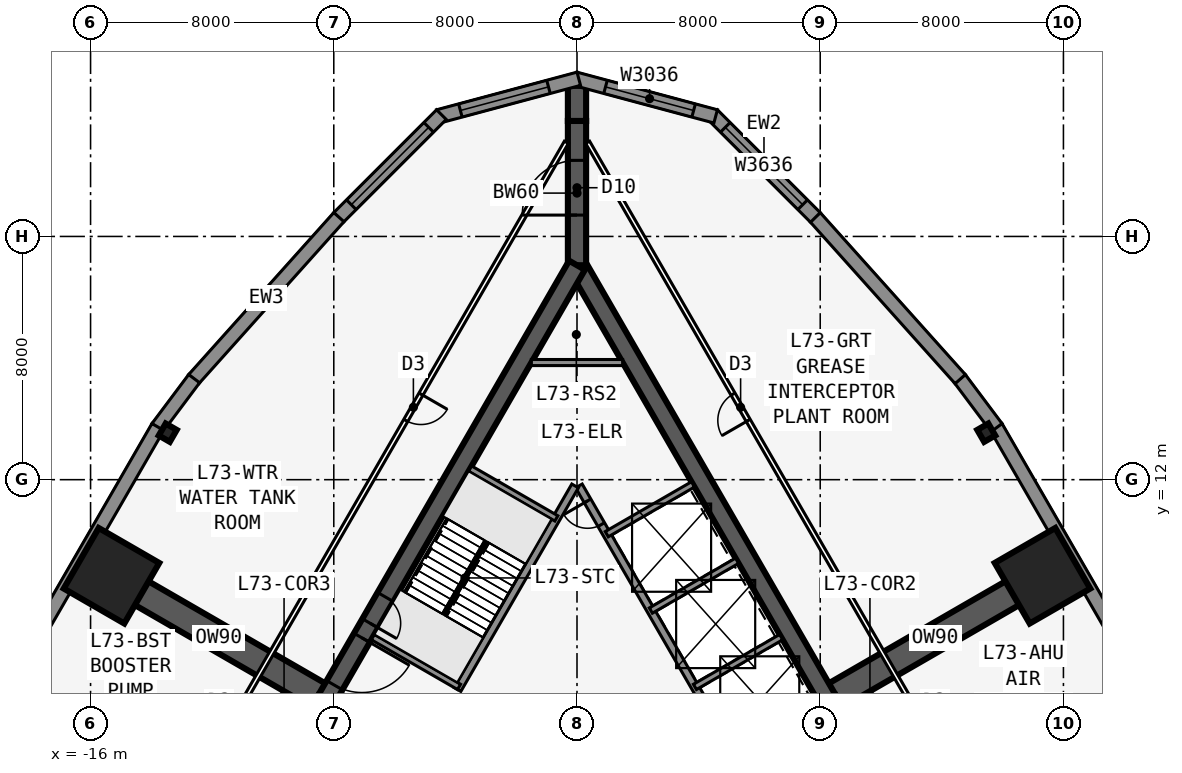
"""IFC4 building model, lengths in metres.
Left out: names, types, materials, properties, quantities, classifications, styles, units other than length and angle.
Written with IfcOpenShell. Run it as: python <this file> out.ifc"""

import sys

from ifc_helpers import new_model, si_unit, direction, frame, frame_2d, origin, origin_2d, place, context, subcontext, project, spatial, polyline, rectangle, i_section, outline, extrude, element, fill, save


model = new_model("IFC4")
c1 = context("Model", 3, precision=1e-05, world=origin(), true_north=direction((0.0, 1.0)))
c2 = subcontext(c1, "Body", "Model", "MODEL_VIEW")
j1 = project(units=[si_unit("LENGTHUNIT", "METRE"), si_unit("PLANEANGLEUNIT", "RADIAN")], contexts=[c1])
p1 = place(None, origin())
s1 = spatial("IfcSite", under=j1, at=p1, CompositionType="ELEMENT")
p2 = place(p1, origin())
s2 = spatial("IfcBuilding", under=s1, at=p2, CompositionType="ELEMENT")
p3 = place(p2, frame((0.0, 0.0, 275.3)))
s3 = spatial("IfcBuildingStorey", under=s2, at=p3, CompositionType="ELEMENT", Elevation=275.3)
p4 = place(p3, frame((8.25, 4.763, 0.0), z_axis=(0.0, 0.0, 1.0), x_axis=(-0.500002952946, 0.866023698893, 0.0)))
e1 = element("IfcWall", 1, at=p4, inside=s3, PredefinedType="SHEAR", context=c2, shape_type="SweptSolid", body=[
    extrude(rectangle(XDim=16.5, YDim=0.6, at=frame_2d((8.25, 0.0))), origin(), (0.0, 0.0, 1.0), 6.0),
])
p5 = place(p3, frame((5.379, 2.586, 0.0), z_axis=(0.0, 0.0, 1.0), x_axis=(-0.500001375892, 0.866024609411, 0.0)))
e2 = element("IfcWall", 2, at=p5, inside=s3, PredefinedType="SOLIDWALL", context=c2, shape_type="SweptSolid", body=[
    extrude(rectangle(XDim=10.633, YDim=0.25, at=frame_2d((5.316, 0.0))), origin(), (0.0, 0.0, 1.0), 5.75),
])
p6 = place(p5, frame((9.164, 0.0, 0.0)))
e3 = element("IfcOpeningElement", 3, at=p6, cuts=e2, PredefinedType="OPENING", context=c2, shape_type="SweptSolid", body=[
    extrude(rectangle(XDim=0.9, YDim=2.13, at=frame_2d((0.45, 1.065))), frame((0.0, 0.135, 0.0), z_axis=(0.0, -1.0, 0.0), x_axis=(1.0, 0.0, 0.0)), (0.0, 0.0, 1.0), 0.27),
])
for number, where, z_axis, x_axis in (
    (4, (3.879, 5.184, 0.0), (0.0, 0.0, 1.0), (0.866, 0.5, 0.0)),
    (5, (2.429, 7.696, 0.0), (0.0, 0.0, 1.0), (0.866, 0.5, 0.0)),
    (6, (0.979, 10.207, 0.0), (0.0, 0.0, 1.0), (0.866, 0.5, 0.0)),
):
    element("IfcWall", number, at=place(p3, frame(where, z_axis=z_axis, x_axis=x_axis)), inside=s3, PredefinedType="SOLIDWALL", context=c2, shape_type="SweptSolid", body=[
        extrude(rectangle(XDim=3.275, YDim=0.2, at=frame_2d((1.637, 0.0))), origin(), (0.0, 0.0, 1.0), 5.75),
    ])
p7 = place(p3, frame((0.0, 19.052, 0.0), z_axis=(0.0, 0.0, 1.0), x_axis=(-0.500002952946, -0.866023698893, 0.0)))
e7 = element("IfcWall", 7, at=p7, inside=s3, PredefinedType="SHEAR", context=c2, shape_type="SweptSolid", body=[
    extrude(rectangle(XDim=16.5, YDim=0.6, at=frame_2d((8.25, 0.0))), origin(), (0.0, 0.0, 1.0), 6.0),
])
p8 = place(p7, frame((14.15, 0.0, 0.0)))
e8 = element("IfcOpeningElement", 8, at=p8, cuts=e7, PredefinedType="OPENING", context=c2, shape_type="SweptSolid", body=[
    extrude(rectangle(XDim=1.8, YDim=2.13, at=frame_2d((0.9, 1.065))), frame((0.0, 0.31, 0.0), z_axis=(0.0, -1.0, 0.0), x_axis=(1.0, 0.0, 0.0)), (0.0, 0.0, 1.0), 0.62),
])
p9 = place(p7, frame((12.6, 0.0, 0.0)))
e9 = element("IfcOpeningElement", 9, at=p9, cuts=e7, PredefinedType="OPENING", context=c2, shape_type="SweptSolid", body=[
    extrude(rectangle(XDim=1.0, YDim=2.13, at=frame_2d((0.5, 1.065))), frame((0.0, 0.31, 0.0), z_axis=(0.0, -1.0, 0.0), x_axis=(1.0, 0.0, 0.0)), (0.0, 0.0, 1.0), 0.62),
])
p10 = place(p3, frame((-0.062, 11.794, 0.0), z_axis=(0.0, 0.0, 1.0), x_axis=(-0.500006680225, -0.86602154692, 0.0)))
e10 = element("IfcWall", 10, at=p10, inside=s3, PredefinedType="SOLIDWALL", context=c2, shape_type="SweptSolid", body=[
    extrude(rectangle(XDim=7.733, YDim=0.25, at=frame_2d((3.866, 0.0))), origin(), (0.0, 0.0, 1.0), 5.75),
])
for number, where, z_axis, x_axis in (
    (11, (-0.679, 10.727, 0.0), (0.0, 0.0, 1.0), (-0.866, 0.5, 0.0)),
    (12, (-3.879, 5.184, 0.0), (0.0, 0.0, 1.0), (-0.866, 0.5, 0.0)),
    (13, (-4.979, 3.279, 0.0), (0.0, 0.0, 1.0), (-0.866, 0.5, 0.0)),
):
    element("IfcWall", number, at=place(p3, frame(where, z_axis=z_axis, x_axis=x_axis)), inside=s3, PredefinedType="SOLIDWALL", context=c2, shape_type="SweptSolid", body=[
        extrude(rectangle(XDim=3.275, YDim=0.2, at=frame_2d((1.637, 0.0))), origin(), (0.0, 0.0, 1.0), 5.75),
    ])
p11 = place(p3, frame((0.0, 19.052, 0.0), z_axis=(0.0, 0.0, 1.0), x_axis=(0.0, 1.0, 0.0)))
e14 = element("IfcWall", 14, at=p11, inside=s3, PredefinedType="SHEAR", context=c2, shape_type="SweptSolid", body=[
    extrude(rectangle(XDim=4.746, YDim=0.6, at=frame_2d((2.373, 0.0))), origin(), (0.0, 0.0, 1.0), 6.0),
])
p12 = place(p11, frame((1.65, 0.0, 0.0)))
e15 = element("IfcOpeningElement", 15, at=p12, cuts=e14, PredefinedType="OPENING", context=c2, shape_type="SweptSolid", body=[
    extrude(rectangle(XDim=1.8, YDim=2.13, at=frame_2d((0.9, 1.065))), frame((0.0, 0.31, 0.0), z_axis=(0.0, -1.0, 0.0), x_axis=(1.0, 0.0, 0.0)), (0.0, 0.0, 1.0), 0.62),
])
p13 = place(p3, frame((0.0, 23.799, 0.0), z_axis=(0.0, 0.0, 1.0), x_axis=(0.0, 1.0, 0.0)))
e16 = element("IfcWall", 16, at=p13, inside=s3, PredefinedType="SHEAR", context=c2, shape_type="SweptSolid", body=[
    extrude(rectangle(XDim=1.155, YDim=0.6, at=frame_2d((0.577, 0.0))), origin(), (0.0, 0.0, 1.0), 6.0),
])
for number, where, z_axis, x_axis in (
    (17, (8.25, 4.763, 0.0), (0.0, 0.0, 1.0), (0.866, 0.5, 0.0)),
    (18, (-8.25, 4.763, 0.0), (0.0, 0.0, 1.0), (-0.866, 0.5, 0.0)),
):
    element("IfcWall", number, at=place(p3, frame(where, z_axis=z_axis, x_axis=x_axis)), inside=s3, PredefinedType="SHEAR", context=c2, shape_type="SweptSolid", body=[
        extrude(rectangle(XDim=8.154, YDim=0.9, at=frame_2d((4.077, 0.0))), origin(), (0.0, 0.0, 1.0), 6.0),
    ])
for number, where, z_axis, x_axis in (
    (19, (13.461, 13.545, 0.0), (0.0, 0.0, 1.0), (0.866, 0.5, 0.0)),
    (20, (-13.461, 13.545, 0.0), (0.0, 0.0, 1.0), (-0.866, 0.5, 0.0)),
):
    element("IfcColumn", number, at=place(p3, frame(where, z_axis=z_axis, x_axis=x_axis)), inside=s3, PredefinedType="COLUMN", context=c2, shape_type="SweptSolid", body=[
        extrude(i_section(OverallWidth=0.419, OverallDepth=0.455, WebThickness=0.042, FlangeThickness=0.068, at=origin_2d()), origin(), (0.0, 0.0, 1.0), 6.0),
    ])
for number, where, z_axis, x_axis in (
    (21, (15.312, 8.84, 0.0), (0.0, 0.0, 1.0), (0.866, 0.5, 0.0)),
    (22, (-15.312, 8.84, 0.0), (0.0, 0.0, 1.0), (-0.866, 0.5, 0.0)),
):
    element("IfcColumn", number, at=place(p3, frame(where, z_axis=z_axis, x_axis=x_axis)), inside=s3, PredefinedType="COLUMN", context=c2, shape_type="SweptSolid", body=[
        extrude(rectangle(XDim=2.3, YDim=2.3, at=origin_2d()), origin(), (0.0, 0.0, 1.0), 6.0),
    ])
p14 = place(p3, frame((18.786, 5.073, 0.0), z_axis=(0.0, 0.0, 1.0), x_axis=(-0.499993662806, 0.866029062534, 0.0)))
e23 = element("IfcWall", 23, at=p14, inside=s3, PredefinedType="SOLIDWALL", context=c2, shape_type="SweptSolid", body=[
    extrude(outline(polyline([(0.0, 0.0), (10.0, 0.0), (10.0, 5.75), (0.0, 5.75), (0.0, 0.0)]), holes=[polyline([(7.25, 2.875), (7.173, 3.457), (6.948, 4.0), (6.591, 4.466), (6.125, 4.823), (5.583, 5.048), (5.0, 5.125), (4.418, 5.048), (3.875, 4.823), (3.409, 4.466), (3.052, 4.0), (2.827, 3.457), (2.75, 2.875), (2.827, 2.293), (3.052, 1.75), (3.409, 1.284), (3.875, 0.926), (4.418, 0.702), (5.0, 0.625), (5.583, 0.702), (6.125, 0.926), (6.591, 1.284), (6.948, 1.75), (7.173, 2.293), (7.25, 2.875)])]), frame((0.0, 0.225, 0.0), z_axis=(0.0, -1.0, 0.0), x_axis=(1.0, 0.0, 0.0)), (0.0, 0.0, 1.0), 0.45),
])
p15 = place(p3, frame((13.801, 13.71, 0.0), z_axis=(0.0, 0.0, 1.0), x_axis=(-0.599592679202, 0.800305328638, 0.0)))
e24 = element("IfcWall", 24, at=p15, inside=s3, PredefinedType="SOLIDWALL", context=c2, shape_type="SweptSolid", body=[
    extrude(rectangle(XDim=2.014, YDim=0.45, at=frame_2d((1.007, 0.0))), origin(), (0.0, 0.0, 1.0), 5.75),
])
p16 = place(p3, frame((12.605, 15.307, 0.0), z_axis=(0.0, 0.0, 1.0), x_axis=(-0.667303550892, 0.744785855778, 0.0)))
e25 = element("IfcWall", 25, at=p16, inside=s3, PredefinedType="SOLIDWALL", context=c2, shape_type="SweptSolid", body=[
    extrude(outline(polyline([(0.0, 0.0), (7.153, 0.0), (7.153, 5.75), (0.0, 5.75), (0.0, 0.0)]), holes=[polyline([(5.826, 2.875), (5.75, 3.457), (5.525, 4.0), (5.167, 4.466), (4.701, 4.823), (4.159, 5.048), (3.576, 5.125), (2.994, 5.048), (2.451, 4.823), (1.985, 4.466), (1.628, 4.0), (1.403, 3.457), (1.326, 2.875), (1.403, 2.293), (1.628, 1.75), (1.985, 1.284), (2.451, 0.926), (2.994, 0.702), (3.576, 0.625), (4.159, 0.702), (4.701, 0.926), (5.167, 1.284), (5.525, 1.75), (5.75, 2.293), (5.826, 2.875)])]), frame((0.0, 0.225, 0.0), z_axis=(0.0, -1.0, 0.0), x_axis=(1.0, 0.0, 0.0)), (0.0, 0.0, 1.0), 0.45),
])
p17 = place(p3, frame((7.841, 20.625, 0.0), z_axis=(0.0, 0.0, 1.0), x_axis=(-0.707106781187, 0.707106781187, 0.0)))
e26 = element("IfcWall", 26, at=p17, inside=s3, PredefinedType="SOLIDWALL", context=c2, shape_type="SweptSolid", body=[
    extrude(rectangle(XDim=4.781, YDim=0.45, at=frame_2d((2.391, 0.0))), origin(), (0.0, 0.0, 1.0), 5.75),
])
p18 = place(p17, frame((0.591, 0.0, 0.9)))
e27 = element("IfcOpeningElement", 27, at=p18, cuts=e26, PredefinedType="OPENING", context=c2, shape_type="SweptSolid", body=[
    extrude(rectangle(XDim=3.6, YDim=3.6, at=frame_2d((1.8, 1.8))), frame((0.0, 0.235, 0.0), z_axis=(0.0, -1.0, 0.0), x_axis=(1.0, 0.0, 0.0)), (0.0, 0.0, 1.0), 0.47),
])
p19 = place(p3, frame((4.561, 23.948, 0.0), z_axis=(0.0, 0.0, 1.0), x_axis=(-0.965926628191, 0.258816052347, 0.0)))
e28 = element("IfcWall", 28, at=p19, inside=s3, PredefinedType="SOLIDWALL", context=c2, shape_type="SweptSolid", body=[
    extrude(outline(polyline([(4.781, 0.225), (4.722, 0.225), (4.375, 0.132), (4.351, 0.225), (0.0, 0.225), (0.0, -0.225), (4.781, -0.225), (4.781, 0.225)])), origin(), (0.0, 0.0, 1.0), 5.75),
])
p20 = place(p19, frame((0.75, 0.0, 0.9)))
e29 = element("IfcOpeningElement", 29, at=p20, cuts=e28, PredefinedType="OPENING", context=c2, shape_type="SweptSolid", body=[
    extrude(rectangle(XDim=3.0, YDim=3.6, at=frame_2d((1.5, 1.8))), frame((0.0, 0.235, 0.0), z_axis=(0.0, -1.0, 0.0), x_axis=(1.0, 0.0, 0.0)), (0.0, 0.0, 1.0), 0.47),
])
p21 = place(p3, frame((0.058, 25.186, 0.0), z_axis=(0.0, 0.0, 1.0), x_axis=(-0.965926628191, -0.258816052347, 0.0)))
e30 = element("IfcWall", 30, at=p21, inside=s3, PredefinedType="SOLIDWALL", context=c2, shape_type="SweptSolid", body=[
    extrude(outline(polyline([(4.781, 0.225), (0.431, 0.225), (0.406, 0.132), (0.059, 0.225), (0.0, 0.225), (0.0, -0.225), (4.781, -0.225), (4.781, 0.225)])), origin(), (0.0, 0.0, 1.0), 5.75),
])
p22 = place(p21, frame((1.031, 0.0, 0.9)))
e31 = element("IfcOpeningElement", 31, at=p22, cuts=e30, PredefinedType="OPENING", context=c2, shape_type="SweptSolid", body=[
    extrude(rectangle(XDim=3.0, YDim=3.6, at=frame_2d((1.5, 1.8))), frame((0.0, 0.235, 0.0), z_axis=(0.0, -1.0, 0.0), x_axis=(1.0, 0.0, 0.0)), (0.0, 0.0, 1.0), 0.47),
])
p23 = place(p3, frame((-4.46, 24.007, 0.0), z_axis=(0.0, 0.0, 1.0), x_axis=(-0.707106781187, -0.707106781187, 0.0)))
e32 = element("IfcWall", 32, at=p23, inside=s3, PredefinedType="SOLIDWALL", context=c2, shape_type="SweptSolid", body=[
    extrude(rectangle(XDim=4.781, YDim=0.45, at=frame_2d((2.391, 0.0))), origin(), (0.0, 0.0, 1.0), 5.75),
])
p24 = place(p23, frame((0.591, 0.0, 0.9)))
e33 = element("IfcOpeningElement", 33, at=p24, cuts=e32, PredefinedType="OPENING", context=c2, shape_type="SweptSolid", body=[
    extrude(rectangle(XDim=3.6, YDim=3.6, at=frame_2d((1.8, 1.8))), frame((0.0, 0.235, 0.0), z_axis=(0.0, -1.0, 0.0), x_axis=(1.0, 0.0, 0.0)), (0.0, 0.0, 1.0), 0.47),
])
p25 = place(p3, frame((-7.833, 20.635, 0.0), z_axis=(0.0, 0.0, 1.0), x_axis=(-0.667303550892, -0.744785855778, 0.0)))
e34 = element("IfcWall", 34, at=p25, inside=s3, PredefinedType="SOLIDWALL", context=c2, shape_type="SweptSolid", body=[
    extrude(outline(polyline([(0.0, 0.0), (7.153, 0.0), (7.153, 5.75), (0.0, 5.75), (0.0, 0.0)]), holes=[polyline([(5.826, 2.875), (5.75, 3.457), (5.525, 4.0), (5.167, 4.466), (4.701, 4.823), (4.159, 5.048), (3.576, 5.125), (2.994, 5.048), (2.451, 4.823), (1.985, 4.466), (1.628, 4.0), (1.403, 3.457), (1.326, 2.875), (1.403, 2.293), (1.628, 1.75), (1.985, 1.284), (2.451, 0.926), (2.994, 0.702), (3.576, 0.625), (4.159, 0.702), (4.701, 0.926), (5.167, 1.284), (5.525, 1.75), (5.75, 2.293), (5.826, 2.875)])]), frame((0.0, 0.225, 0.0), z_axis=(0.0, -1.0, 0.0), x_axis=(1.0, 0.0, 0.0)), (0.0, 0.0, 1.0), 0.45),
])
p26 = place(p3, frame((-12.593, 15.323, 0.0), z_axis=(0.0, 0.0, 1.0), x_axis=(-0.599592679202, -0.800305328638, 0.0)))
e35 = element("IfcWall", 35, at=p26, inside=s3, PredefinedType="SOLIDWALL", context=c2, shape_type="SweptSolid", body=[
    extrude(rectangle(XDim=2.014, YDim=0.45, at=frame_2d((1.007, 0.0))), origin(), (0.0, 0.0, 1.0), 5.75),
])
p27 = place(p3, frame((-13.786, 13.733, 0.0), z_axis=(0.0, 0.0, 1.0), x_axis=(-0.499993662806, -0.866029062534, 0.0)))
e36 = element("IfcWall", 36, at=p27, inside=s3, PredefinedType="SOLIDWALL", context=c2, shape_type="SweptSolid", body=[
    extrude(outline(polyline([(0.0, 0.0), (10.0, 0.0), (10.0, 5.75), (0.0, 5.75), (0.0, 0.0)]), holes=[polyline([(7.25, 2.875), (7.173, 3.457), (6.948, 4.0), (6.591, 4.466), (6.125, 4.823), (5.583, 5.048), (5.0, 5.125), (4.418, 5.048), (3.875, 4.823), (3.409, 4.466), (3.052, 4.0), (2.827, 3.457), (2.75, 2.875), (2.827, 2.293), (3.052, 1.75), (3.409, 1.284), (3.875, 0.926), (4.418, 0.702), (5.0, 0.625), (5.583, 0.702), (6.125, 0.926), (6.591, 1.284), (6.948, 1.75), (7.173, 2.293), (7.25, 2.875)])]), frame((0.0, 0.225, 0.0), z_axis=(0.0, -1.0, 0.0), x_axis=(1.0, 0.0, 0.0)), (0.0, 0.0, 1.0), 0.45),
])
p28 = place(p3, frame((20.177, -11.245, 0.0), z_axis=(0.0, 0.0, 1.0), x_axis=(-0.499998875317, 0.866026053119, 0.0)))
e37 = element("IfcWall", 37, at=p28, inside=s3, PredefinedType="PARTITIONING", context=c2, shape_type="SweptSolid", body=[
    extrude(rectangle(XDim=39.654, YDim=0.15, at=frame_2d((19.827, 0.0))), origin(), (0.0, 0.0, 1.0), 5.75),
])
p29 = place(p28, frame((6.563, 0.0, 0.0)))
e38 = element("IfcOpeningElement", 38, at=p29, cuts=e37, PredefinedType="OPENING", context=c2, shape_type="SweptSolid", body=[
    extrude(rectangle(XDim=1.0, YDim=2.13, at=frame_2d((0.5, 1.065))), frame((0.0, 0.085, 0.0), z_axis=(0.0, -1.0, 0.0), x_axis=(1.0, 0.0, 0.0)), (0.0, 0.0, 1.0), 0.17),
])
p30 = place(p28, frame((16.327, 0.0, 0.0)))
e39 = element("IfcOpeningElement", 39, at=p30, cuts=e37, PredefinedType="OPENING", context=c2, shape_type="SweptSolid", body=[
    extrude(rectangle(XDim=1.0, YDim=2.13, at=frame_2d((0.5, 1.065))), frame((0.0, 0.085, 0.0), z_axis=(0.0, -1.0, 0.0), x_axis=(1.0, 0.0, 0.0)), (0.0, 0.0, 1.0), 0.17),
])
p31 = place(p28, frame((29.091, 0.0, 0.0)))
e40 = element("IfcOpeningElement", 40, at=p31, cuts=e37, PredefinedType="OPENING", context=c2, shape_type="SweptSolid", body=[
    extrude(rectangle(XDim=1.0, YDim=2.13, at=frame_2d((0.5, 1.065))), frame((0.0, 0.085, 0.0), z_axis=(0.0, -1.0, 0.0), x_axis=(1.0, 0.0, 0.0)), (0.0, 0.0, 1.0), 0.17),
])
p32 = place(p3, frame((-0.35, 23.096, 0.0), z_axis=(0.0, 0.0, 1.0), x_axis=(-0.499998875317, -0.866026053119, 0.0)))
e41 = element("IfcWall", 41, at=p32, inside=s3, PredefinedType="PARTITIONING", context=c2, shape_type="SweptSolid", body=[
    extrude(rectangle(XDim=39.654, YDim=0.15, at=frame_2d((19.827, 0.0))), origin(), (0.0, 0.0, 1.0), 5.75),
])
p33 = place(p32, frame((9.563, 0.0, 0.0)))
e42 = element("IfcOpeningElement", 42, at=p33, cuts=e41, PredefinedType="OPENING", context=c2, shape_type="SweptSolid", body=[
    extrude(rectangle(XDim=1.0, YDim=2.13, at=frame_2d((0.5, 1.065))), frame((0.0, 0.085, 0.0), z_axis=(0.0, -1.0, 0.0), x_axis=(1.0, 0.0, 0.0)), (0.0, 0.0, 1.0), 0.17),
])
p34 = place(p32, frame((22.327, 0.0, 0.0)))
e43 = element("IfcOpeningElement", 43, at=p34, cuts=e41, PredefinedType="OPENING", context=c2, shape_type="SweptSolid", body=[
    extrude(rectangle(XDim=1.0, YDim=2.13, at=frame_2d((0.5, 1.065))), frame((0.0, 0.085, 0.0), z_axis=(0.0, -1.0, 0.0), x_axis=(1.0, 0.0, 0.0)), (0.0, 0.0, 1.0), 0.17),
])
p35 = place(p32, frame((32.091, 0.0, 0.0)))
e44 = element("IfcOpeningElement", 44, at=p35, cuts=e41, PredefinedType="OPENING", context=c2, shape_type="SweptSolid", body=[
    extrude(rectangle(XDim=1.0, YDim=2.13, at=frame_2d((0.5, 1.065))), frame((0.0, 0.085, 0.0), z_axis=(0.0, -1.0, 0.0), x_axis=(1.0, 0.0, 0.0)), (0.0, 0.0, 1.0), 0.17),
])
p36 = place(p3, frame((-1.501, 15.853, 0.0), z_axis=(0.0, 0.0, 1.0), x_axis=(1.0, 0.0, 0.0)))
e45 = element("IfcWall", 45, at=p36, inside=s3, PredefinedType="SOLIDWALL", context=c2, shape_type="SweptSolid", body=[
    extrude(rectangle(XDim=3.002, YDim=0.2, at=frame_2d((1.501, 0.0))), origin(), (0.0, 0.0, 1.0), 5.75),
])
p37 = place(p3, frame((-2.988, 9.978, 0.0), z_axis=(0.0, 0.0, 1.0), x_axis=(-0.499992232847, -0.866029888106, 0.0)))
e46 = element("IfcWall", 46, at=p37, inside=s3, PredefinedType="SOLIDWALL", context=c2, shape_type="SweptSolid", body=[
    extrude(rectangle(XDim=2.794, YDim=0.1, at=frame_2d((1.397, 0.0))), origin(), (0.0, 0.0, 1.0), 6.0),
])
p38 = place(p18, origin())
e47 = element("IfcWindow", 47, at=p38, inside=s3, PartitioningType="SINGLE_PANEL", PredefinedType="WINDOW", context=c2, shape_type="SweptSolid", body=[
    extrude(rectangle(XDim=3.6, YDim=3.6, at=frame_2d((1.8, 1.8))), frame((0.0, 0.03, 0.0), z_axis=(0.0, -1.0, 0.0), x_axis=(1.0, 0.0, 0.0)), (0.0, 0.0, 1.0), 0.06),
])
fill(e27, e47)
p39 = place(p20, origin())
e48 = element("IfcWindow", 48, at=p39, inside=s3, PartitioningType="SINGLE_PANEL", PredefinedType="WINDOW", context=c2, shape_type="SweptSolid", body=[
    extrude(rectangle(XDim=3.0, YDim=3.6, at=frame_2d((1.5, 1.8))), frame((0.0, 0.03, 0.0), z_axis=(0.0, -1.0, 0.0), x_axis=(1.0, 0.0, 0.0)), (0.0, 0.0, 1.0), 0.06),
])
fill(e29, e48)
p40 = place(p22, origin())
e49 = element("IfcWindow", 49, at=p40, inside=s3, PartitioningType="SINGLE_PANEL", PredefinedType="WINDOW", context=c2, shape_type="SweptSolid", body=[
    extrude(rectangle(XDim=3.0, YDim=3.6, at=frame_2d((1.5, 1.8))), frame((0.0, 0.03, 0.0), z_axis=(0.0, -1.0, 0.0), x_axis=(1.0, 0.0, 0.0)), (0.0, 0.0, 1.0), 0.06),
])
fill(e31, e49)
p41 = place(p24, origin())
e50 = element("IfcWindow", 50, at=p41, inside=s3, PartitioningType="SINGLE_PANEL", PredefinedType="WINDOW", context=c2, shape_type="SweptSolid", body=[
    extrude(rectangle(XDim=3.6, YDim=3.6, at=frame_2d((1.8, 1.8))), frame((0.0, 0.03, 0.0), z_axis=(0.0, -1.0, 0.0), x_axis=(1.0, 0.0, 0.0)), (0.0, 0.0, 1.0), 0.06),
])
fill(e33, e50)
p42 = place(p31, origin())
e51 = element("IfcDoor", 51, at=p42, inside=s3, OperationType="SINGLE_SWING_LEFT", PredefinedType="DOOR", context=c2, shape_type="SweptSolid", body=[
    extrude(rectangle(XDim=1.0, YDim=2.13, at=frame_2d((0.5, 1.065))), frame((0.0, 0.025, 0.0), z_axis=(0.0, -1.0, 0.0), x_axis=(1.0, 0.0, 0.0)), (0.0, 0.0, 1.0), 0.05),
])
fill(e40, e51)
p43 = place(p33, origin())
e52 = element("IfcDoor", 52, at=p43, inside=s3, OperationType="SINGLE_SWING_LEFT", PredefinedType="DOOR", context=c2, shape_type="SweptSolid", body=[
    extrude(rectangle(XDim=1.0, YDim=2.13, at=frame_2d((0.5, 1.065))), frame((0.0, 0.025, 0.0), z_axis=(0.0, -1.0, 0.0), x_axis=(1.0, 0.0, 0.0)), (0.0, 0.0, 1.0), 0.05),
])
fill(e42, e52)
p44 = place(p8, origin())
e53 = element("IfcDoor", 53, at=p44, inside=s3, OperationType="DOUBLE_DOOR_SINGLE_SWING", PredefinedType="DOOR", context=c2, shape_type="SweptSolid", body=[
    extrude(rectangle(XDim=1.8, YDim=2.13, at=frame_2d((0.9, 1.065))), frame((0.0, 0.025, 0.0), z_axis=(0.0, -1.0, 0.0), x_axis=(1.0, 0.0, 0.0)), (0.0, 0.0, 1.0), 0.05),
])
fill(e8, e53)
p45 = place(p9, origin())
e54 = element("IfcDoor", 54, at=p45, inside=s3, OperationType="SINGLE_SWING_RIGHT", PredefinedType="DOOR", context=c2, shape_type="SweptSolid", body=[
    extrude(rectangle(XDim=1.0, YDim=2.13, at=frame_2d((0.5, 1.065))), frame((0.0, 0.025, 0.0), z_axis=(0.0, -1.0, 0.0), x_axis=(1.0, 0.0, 0.0)), (0.0, 0.0, 1.0), 0.05),
])
fill(e9, e54)
p46 = place(p12, origin())
e55 = element("IfcDoor", 55, at=p46, inside=s3, OperationType="DOUBLE_DOOR_DOUBLE_SWING", PredefinedType="DOOR", context=c2, shape_type="SweptSolid", body=[
    extrude(rectangle(XDim=1.8, YDim=2.13, at=frame_2d((0.9, 1.065))), frame((0.0, 0.025, 0.0), z_axis=(0.0, -1.0, 0.0), x_axis=(1.0, 0.0, 0.0)), (0.0, 0.0, 1.0), 0.05),
])
fill(e15, e55)
p47 = place(p6, origin())
e56 = element("IfcDoor", 56, at=p47, inside=s3, OperationType="SINGLE_SWING_RIGHT", PredefinedType="DOOR", context=c2, shape_type="SweptSolid", body=[
    extrude(rectangle(XDim=0.9, YDim=2.13, at=frame_2d((0.45, 1.065))), frame((0.0, 0.025, 0.0), z_axis=(0.0, -1.0, 0.0), x_axis=(1.0, 0.0, 0.0)), (0.0, 0.0, 1.0), 0.05),
])
fill(e3, e56)
save(model, sys.argv[1])
